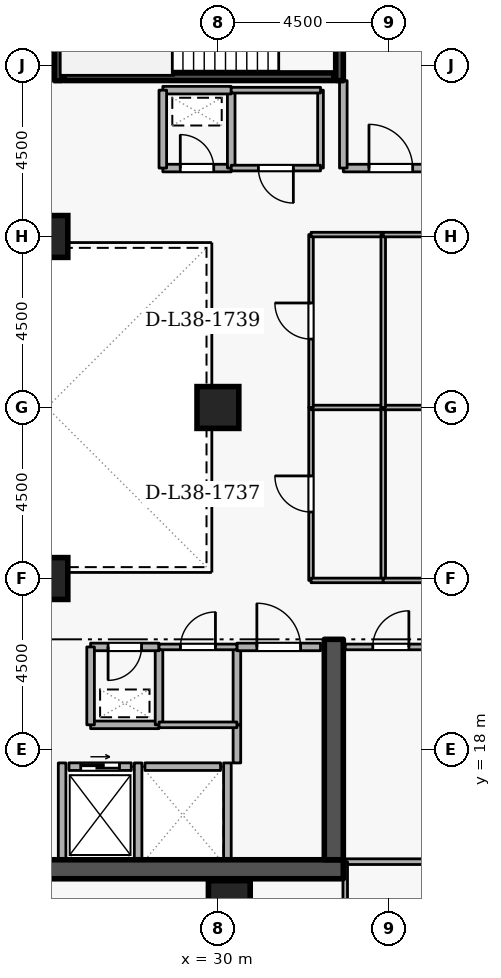
"""IFC4 building model, lengths in metres.
Left out: names, types, materials, properties, quantities, classifications, styles, units other than length and angle.
Written with IfcOpenShell. Run it as: python <this file> out.ifc"""

import sys

from ifc_helpers import new_model, si_unit, direction, frame, frame_2d, origin, origin_2d, place, context, subcontext, project, spatial, rectangle, extrude, element, fill, save


model = new_model("IFC4")
c1 = context("Model", 3, precision=1e-05, world=origin(), true_north=direction((0.0, 1.0)))
c2 = subcontext(c1, "Body", "Model", "MODEL_VIEW")
j1 = project(units=[si_unit("LENGTHUNIT", "METRE"), si_unit("PLANEANGLEUNIT", "RADIAN")], contexts=[c1])
p1 = place(None, origin())
s1 = spatial("IfcSite", under=j1, at=p1, CompositionType="ELEMENT")
p2 = place(p1, origin())
s2 = spatial("IfcBuilding", under=s1, at=p2, CompositionType="ELEMENT")
p3 = place(p2, frame((0.0, 0.0, 145.5)))
s3 = spatial("IfcBuildingStorey", under=s2, at=p3, CompositionType="ELEMENT", Elevation=145.5)
p4 = place(p3, frame((17.7, 14.85, 0.0), z_axis=(0.0, 0.0, 1.0), x_axis=(1.0, 0.0, 0.0)))
e1 = element("IfcWall", 1, at=p4, inside=s3, PredefinedType="SHEAR", context=c2, shape_type="SweptSolid", body=[
    extrude(rectangle(XDim=15.6, YDim=0.5, at=frame_2d((7.8, 0.0))), origin(), (0.0, 0.0, 1.0), 3.6),
])
p5 = place(p3, frame((33.05, 15.1, 0.0), z_axis=(0.0, 0.0, 1.0), x_axis=(0.0, 1.0, 0.0)))
e2 = element("IfcWall", 2, at=p5, inside=s3, PredefinedType="SHEAR", context=c2, shape_type="SweptSolid", body=[
    extrude(rectangle(XDim=5.8, YDim=0.5, at=frame_2d((2.9, 0.0))), origin(), (0.0, 0.0, 1.0), 3.6),
])
for number, where, z_axis, x_axis in (
    (3, (30.3, 14.0, 0.0), (0.0, 0.0, 1.0), (1.0, 0.0, 0.0)),
    (4, (25.5, 22.5, 0.0), (0.0, 0.0, 1.0), (1.0, 0.0, 0.0)),
    (5, (25.5, 31.5, 0.0), (0.0, 0.0, 1.0), (1.0, 0.0, 0.0)),
    (6, (30.0, 27.0, 0.0), (0.0, 0.0, 1.0), (1.0, 0.0, 0.0)),
):
    element("IfcColumn", number, at=place(p3, frame(where, z_axis=z_axis, x_axis=x_axis)), inside=s3, PredefinedType="COLUMN", context=c2, shape_type="SweptSolid", body=[
        extrude(rectangle(XDim=1.1, YDim=1.1, at=origin_2d()), origin(), (0.0, 0.0, 1.0), 3.6),
    ])
p6 = place(p3, frame((26.08, 17.55, 0.0), z_axis=(0.0, 0.0, 1.0), x_axis=(1.0, 0.0, 0.0)))
e7 = element("IfcWall", 7, at=p6, inside=s3, PredefinedType="STANDARD", context=c2, shape_type="SweptSolid", body=[
    extrude(rectangle(XDim=1.64, YDim=0.2, at=frame_2d((0.82, 0.0))), origin(), (0.0, 0.0, 1.0), 3.3),
])
p7 = place(p6, frame((0.31, 0.0, 0.0)))
e8 = element("IfcOpeningElement", 8, at=p7, cuts=e7, PredefinedType="OPENING", context=c2, shape_type="SweptSolid", body=[
    extrude(rectangle(XDim=1.02, YDim=2.06, at=frame_2d((0.51, 1.03))), frame((0.0, 0.11, 0.0), z_axis=(0.0, -1.0, 0.0), x_axis=(1.0, 0.0, 0.0)), (0.0, 0.0, 1.0), 0.22),
])
p8 = place(p3, frame((28.08, 17.55, 0.0), z_axis=(0.0, 0.0, 1.0), x_axis=(1.0, 0.0, 0.0)))
e9 = element("IfcWall", 9, at=p8, inside=s3, PredefinedType="STANDARD", context=c2, shape_type="SweptSolid", body=[
    extrude(rectangle(XDim=1.99, YDim=0.2, at=frame_2d((0.995, 0.0))), origin(), (0.0, 0.0, 1.0), 3.3),
])
p9 = place(p3, frame((27.9, 15.112, 0.0), z_axis=(0.0, 0.0, 1.0), x_axis=(0.0, 1.0, 0.0)))
e10 = element("IfcWall", 10, at=p9, inside=s3, PredefinedType="STANDARD", context=c2, shape_type="SweptSolid", body=[
    extrude(rectangle(XDim=2.536, YDim=0.2, at=frame_2d((1.268, 0.0))), origin(), (0.0, 0.0, 1.0), 3.3),
])
p10 = place(p3, frame((25.9, 15.112, 0.0), z_axis=(0.0, 0.0, 1.0), x_axis=(0.0, 1.0, 0.0)))
e11 = element("IfcWall", 11, at=p10, inside=s3, PredefinedType="STANDARD", context=c2, shape_type="SweptSolid", body=[
    extrude(rectangle(XDim=2.536, YDim=0.2, at=frame_2d((1.268, 0.0))), origin(), (0.0, 0.0, 1.0), 1.685),
])
p11 = place(p3, frame((30.25, 15.112, 0.0), z_axis=(0.0, 0.0, 1.0), x_axis=(0.0, 1.0, 0.0)))
e12 = element("IfcWall", 12, at=p11, inside=s3, PredefinedType="STANDARD", context=c2, shape_type="SweptSolid", body=[
    extrude(rectangle(XDim=2.536, YDim=0.2, at=frame_2d((1.268, 0.0))), origin(), (0.0, 0.0, 1.0), 3.3),
])
p12 = place(p3, frame((33.2, 38.95, 0.0), z_axis=(0.0, 0.0, 1.0), x_axis=(0.0, -1.0, 0.0)))
e13 = element("IfcWall", 13, at=p12, inside=s3, PredefinedType="SHEAR", context=c2, shape_type="SweptSolid", body=[
    extrude(rectangle(XDim=3.35, YDim=0.2, at=frame_2d((1.675, 0.0))), origin(), (0.0, 0.0, 1.0), 3.6),
])
p13 = place(p12, frame((1.125, 0.0, 0.0)))
e14 = element("IfcOpeningElement", 14, at=p13, cuts=e13, PredefinedType="OPENING", context=c2, shape_type="SweptSolid", body=[
    extrude(rectangle(XDim=1.1, YDim=2.1, at=frame_2d((0.55, 1.05))), frame((0.0, 0.11, 0.0), z_axis=(0.0, -1.0, 0.0), x_axis=(1.0, 0.0, 0.0)), (0.0, 0.0, 1.0), 0.22),
])
p14 = place(p3, frame((25.8, 35.6, 0.0), z_axis=(0.0, 0.0, 1.0), x_axis=(0.0, 1.0, 0.0)))
e15 = element("IfcWall", 15, at=p14, inside=s3, PredefinedType="SHEAR", context=c2, shape_type="SweptSolid", body=[
    extrude(rectangle(XDim=3.35, YDim=0.2, at=frame_2d((1.675, 0.0))), origin(), (0.0, 0.0, 1.0), 3.6),
])
p15 = place(p3, frame((25.95, 35.703, 0.0), z_axis=(0.0, 0.0, 1.0), x_axis=(1.0, 0.0, 0.0)))
e16 = element("IfcWall", 16, at=p15, inside=s3, PredefinedType="SHEAR", context=c2, shape_type="SweptSolid", body=[
    extrude(rectangle(XDim=7.1, YDim=0.2, at=frame_2d((3.55, 0.0))), origin(), (0.0, 0.0, 1.0), 3.6),
])
p16 = place(p3, frame((33.3, 33.3, 0.0), z_axis=(0.0, 0.0, 1.0), x_axis=(1.0, 0.0, 0.0)))
e17 = element("IfcWall", 17, at=p16, inside=s3, PredefinedType="STANDARD", context=c2, shape_type="SweptSolid", body=[
    extrude(rectangle(XDim=2.5, YDim=0.2, at=frame_2d((1.25, 0.0))), origin(), (0.0, 0.0, 1.0), 3.3),
])
p17 = place(p16, frame((0.675, 0.0, 0.0)))
e18 = element("IfcOpeningElement", 18, at=p17, cuts=e17, PredefinedType="OPENING", context=c2, shape_type="SweptSolid", body=[
    extrude(rectangle(XDim=1.15, YDim=2.1, at=frame_2d((0.575, 1.05))), frame((0.0, 0.11, 0.0), z_axis=(0.0, -1.0, 0.0), x_axis=(1.0, 0.0, 0.0)), (0.0, 0.0, 1.0), 0.22),
])
p18 = place(p3, frame((33.3, 35.6, 0.0), z_axis=(0.0, 0.0, 1.0), x_axis=(0.0, -1.0, 0.0)))
e19 = element("IfcWall", 19, at=p18, inside=s3, PredefinedType="STANDARD", context=c2, shape_type="SweptSolid", body=[
    extrude(rectangle(XDim=2.3, YDim=0.2, at=frame_2d((1.15, 0.0))), origin(), (0.0, 0.0, 1.0), 2.505),
])
p19 = place(p3, frame((26.65, 18.65, 0.0), z_axis=(0.0, 0.0, 1.0), x_axis=(1.0, 0.0, 0.0)))
e20 = element("IfcWall", 20, at=p19, inside=s3, PredefinedType="STANDARD", context=c2, shape_type="SweptSolid", body=[
    extrude(rectangle(XDim=1.8, YDim=0.2, at=frame_2d((0.9, 0.0))), origin(), (0.0, 0.0, 1.0), 3.3),
])
p20 = place(p3, frame((28.45, 18.65, 0.0), z_axis=(0.0, 0.0, 1.0), x_axis=(0.0, 1.0, 0.0)))
e21 = element("IfcWall", 21, at=p20, inside=s3, PredefinedType="STANDARD", context=c2, shape_type="SweptSolid", body=[
    extrude(rectangle(XDim=2.05, YDim=0.2, at=frame_2d((1.025, 0.0))), origin(), (0.0, 0.0, 1.0), 3.3),
])
p21 = place(p3, frame((28.45, 20.7, 0.0), z_axis=(0.0, 0.0, 1.0), x_axis=(-1.0, 0.0, 0.0)))
e22 = element("IfcWall", 22, at=p21, inside=s3, PredefinedType="STANDARD", context=c2, shape_type="SweptSolid", body=[
    extrude(rectangle(XDim=1.8, YDim=0.2, at=frame_2d((0.9, 0.0))), origin(), (0.0, 0.0, 1.0), 3.3),
])
p22 = place(p21, frame((0.46, 0.0, 0.0)))
e23 = element("IfcOpeningElement", 23, at=p22, cuts=e22, PredefinedType="OPENING", context=c2, shape_type="SweptSolid", body=[
    extrude(rectangle(XDim=0.88, YDim=2.04, at=frame_2d((0.44, 1.02))), frame((0.0, 0.11, 0.0), z_axis=(0.0, -1.0, 0.0), x_axis=(1.0, 0.0, 0.0)), (0.0, 0.0, 1.0), 0.22),
])
p23 = place(p3, frame((26.65, 20.7, 0.0), z_axis=(0.0, 0.0, 1.0), x_axis=(0.0, -1.0, 0.0)))
e24 = element("IfcWall", 24, at=p23, inside=s3, PredefinedType="STANDARD", context=c2, shape_type="SweptSolid", body=[
    extrude(rectangle(XDim=2.05, YDim=0.2, at=frame_2d((1.025, 0.0))), origin(), (0.0, 0.0, 1.0), 3.3),
])
p24 = place(p3, frame((28.55, 33.3, 0.0), z_axis=(0.0, 0.0, 1.0), x_axis=(1.0, 0.0, 0.0)))
e25 = element("IfcWall", 25, at=p24, inside=s3, PredefinedType="STANDARD", context=c2, shape_type="SweptSolid", body=[
    extrude(rectangle(XDim=1.8, YDim=0.2, at=frame_2d((0.9, 0.0))), origin(), (0.0, 0.0, 1.0), 3.3),
])
p25 = place(p24, frame((0.46, 0.0, 0.0)))
e26 = element("IfcOpeningElement", 26, at=p25, cuts=e25, PredefinedType="OPENING", context=c2, shape_type="SweptSolid", body=[
    extrude(rectangle(XDim=0.88, YDim=2.04, at=frame_2d((0.44, 1.02))), frame((0.0, 0.11, 0.0), z_axis=(0.0, -1.0, 0.0), x_axis=(1.0, 0.0, 0.0)), (0.0, 0.0, 1.0), 0.22),
])
p26 = place(p3, frame((30.35, 33.3, 0.0), z_axis=(0.0, 0.0, 1.0), x_axis=(0.0, 1.0, 0.0)))
e27 = element("IfcWall", 27, at=p26, inside=s3, PredefinedType="STANDARD", context=c2, shape_type="SweptSolid", body=[
    extrude(rectangle(XDim=2.05, YDim=0.2, at=frame_2d((1.025, 0.0))), origin(), (0.0, 0.0, 1.0), 3.3),
])
p27 = place(p3, frame((30.35, 35.35, 0.0), z_axis=(0.0, 0.0, 1.0), x_axis=(-1.0, 0.0, 0.0)))
e28 = element("IfcWall", 28, at=p27, inside=s3, PredefinedType="STANDARD", context=c2, shape_type="SweptSolid", body=[
    extrude(rectangle(XDim=1.8, YDim=0.2, at=frame_2d((0.9, 0.0))), origin(), (0.0, 0.0, 1.0), 3.3),
])
p28 = place(p3, frame((28.55, 35.35, 0.0), z_axis=(0.0, 0.0, 1.0), x_axis=(0.0, -1.0, 0.0)))
e29 = element("IfcWall", 29, at=p28, inside=s3, PredefinedType="STANDARD", context=c2, shape_type="SweptSolid", body=[
    extrude(rectangle(XDim=2.05, YDim=0.2, at=frame_2d((1.025, 0.0))), origin(), (0.0, 0.0, 1.0), 3.3),
])
p29 = place(p3, frame((30.5, 17.648, 0.0), z_axis=(0.0, 0.0, 1.0), x_axis=(0.0, 1.0, 0.0)))
e30 = element("IfcWall", 30, at=p29, inside=s3, PredefinedType="STANDARD", context=c2, shape_type="SweptSolid", body=[
    extrude(rectangle(XDim=1.002, YDim=0.2, at=frame_2d((0.501, 0.0))), origin(), (0.0, 0.0, 1.0), 3.3),
])
p30 = place(p3, frame((30.5, 18.65, 0.0), z_axis=(0.0, 0.0, 1.0), x_axis=(0.0, 1.0, 0.0)))
e31 = element("IfcWall", 31, at=p30, inside=s3, PredefinedType="STANDARD", context=c2, shape_type="SweptSolid", body=[
    extrude(rectangle(XDim=2.05, YDim=0.2, at=frame_2d((1.025, 0.0))), origin(), (0.0, 0.0, 1.0), 3.3),
])
p31 = place(p3, frame((30.5, 20.7, 0.0), z_axis=(0.0, 0.0, 1.0), x_axis=(1.0, 0.0, 0.0)))
e32 = element("IfcWall", 32, at=p31, inside=s3, PredefinedType="STANDARD", context=c2, shape_type="SweptSolid", body=[
    extrude(rectangle(XDim=2.2, YDim=0.2, at=frame_2d((1.1, 0.0))), origin(), (0.0, 0.0, 1.0), 3.3),
])
p32 = place(p31, frame((0.525, 0.0, 0.0)))
e33 = element("IfcOpeningElement", 33, at=p32, cuts=e32, PredefinedType="OPENING", context=c2, shape_type="SweptSolid", body=[
    extrude(rectangle(XDim=1.15, YDim=2.1, at=frame_2d((0.575, 1.05))), frame((0.0, 0.11, 0.0), z_axis=(0.0, -1.0, 0.0), x_axis=(1.0, 0.0, 0.0)), (0.0, 0.0, 1.0), 0.22),
])
p33 = place(p3, frame((30.5, 18.65, 0.0), z_axis=(0.0, 0.0, 1.0), x_axis=(-1.0, 0.0, 0.0)))
e34 = element("IfcWall", 34, at=p33, inside=s3, PredefinedType="PARTITIONING", context=c2, shape_type="SweptSolid", body=[
    extrude(rectangle(XDim=2.05, YDim=0.15, at=frame_2d((1.025, 0.0))), origin(), (0.0, 0.0, 1.0), 3.3),
])
p34 = place(p3, frame((28.45, 20.7, 0.0), z_axis=(0.0, 0.0, 1.0), x_axis=(1.0, 0.0, 0.0)))
e35 = element("IfcWall", 35, at=p34, inside=s3, PredefinedType="PARTITIONING", context=c2, shape_type="SweptSolid", body=[
    extrude(rectangle(XDim=2.05, YDim=0.15, at=frame_2d((1.025, 0.0))), origin(), (0.0, 0.0, 1.0), 3.3),
])
p35 = place(p34, frame((0.565, 0.0, 0.0)))
e36 = element("IfcOpeningElement", 36, at=p35, cuts=e35, PredefinedType="OPENING", context=c2, shape_type="SweptSolid", body=[
    extrude(rectangle(XDim=0.92, YDim=2.08, at=frame_2d((0.46, 1.04))), frame((0.0, 0.085, 0.0), z_axis=(0.0, -1.0, 0.0), x_axis=(1.0, 0.0, 0.0)), (0.0, 0.0, 1.0), 0.17),
])
p36 = place(p3, frame((32.7, 35.35, 0.0), z_axis=(0.0, 0.0, 1.0), x_axis=(0.0, -1.0, 0.0)))
e37 = element("IfcWall", 37, at=p36, inside=s3, PredefinedType="PARTITIONING", context=c2, shape_type="SweptSolid", body=[
    extrude(rectangle(XDim=2.05, YDim=0.15, at=frame_2d((1.025, 0.0))), origin(), (0.0, 0.0, 1.0), 2.505),
])
p37 = place(p3, frame((32.7, 33.3, 0.0), z_axis=(0.0, 0.0, 1.0), x_axis=(-1.0, 0.0, 0.0)))
e38 = element("IfcWall", 38, at=p37, inside=s3, PredefinedType="PARTITIONING", context=c2, shape_type="SweptSolid", body=[
    extrude(rectangle(XDim=2.35, YDim=0.15, at=frame_2d((1.175, 0.0))), origin(), (0.0, 0.0, 1.0), 3.3),
])
p38 = place(p37, frame((0.715, 0.0, 0.0)))
e39 = element("IfcOpeningElement", 39, at=p38, cuts=e38, PredefinedType="OPENING", context=c2, shape_type="SweptSolid", body=[
    extrude(rectangle(XDim=0.92, YDim=2.08, at=frame_2d((0.46, 1.04))), frame((0.0, 0.085, 0.0), z_axis=(0.0, -1.0, 0.0), x_axis=(1.0, 0.0, 0.0)), (0.0, 0.0, 1.0), 0.17),
])
p39 = place(p3, frame((30.35, 35.35, 0.0), z_axis=(0.0, 0.0, 1.0), x_axis=(1.0, 0.0, 0.0)))
e40 = element("IfcWall", 40, at=p39, inside=s3, PredefinedType="PARTITIONING", context=c2, shape_type="SweptSolid", body=[
    extrude(rectangle(XDim=2.35, YDim=0.15, at=frame_2d((1.175, 0.0))), origin(), (0.0, 0.0, 1.0), 3.3),
])
p40 = place(p3, frame((35.75, 15.05, 0.0), z_axis=(0.0, 0.0, 1.0), x_axis=(-1.0, 0.0, 0.0)))
e41 = element("IfcWall", 41, at=p40, inside=s3, PredefinedType="PARTITIONING", context=c2, shape_type="SweptSolid", body=[
    extrude(rectangle(XDim=2.4, YDim=0.15, at=frame_2d((1.2, 0.0))), origin(), (0.0, 0.0, 1.0), 3.3),
])
p41 = place(p3, frame((33.35, 20.7, 0.0), z_axis=(0.0, 0.0, 1.0), x_axis=(1.0, 0.0, 0.0)))
e42 = element("IfcWall", 42, at=p41, inside=s3, PredefinedType="PARTITIONING", context=c2, shape_type="SweptSolid", body=[
    extrude(rectangle(XDim=2.4, YDim=0.15, at=frame_2d((1.2, 0.0))), origin(), (0.0, 0.0, 1.0), 3.3),
])
p42 = place(p41, frame((0.725, 0.0, 0.0)))
e43 = element("IfcOpeningElement", 43, at=p42, cuts=e42, PredefinedType="OPENING", context=c2, shape_type="SweptSolid", body=[
    extrude(rectangle(XDim=0.95, YDim=2.1, at=frame_2d((0.475, 1.05))), frame((0.0, 0.085, 0.0), z_axis=(0.0, -1.0, 0.0), x_axis=(1.0, 0.0, 0.0)), (0.0, 0.0, 1.0), 0.17),
])
p43 = place(p3, frame((32.45, 22.45, 0.0), z_axis=(0.0, 0.0, 1.0), x_axis=(0.0, 1.0, 0.0)))
e44 = element("IfcWall", 44, at=p43, inside=s3, PredefinedType="PARTITIONING", context=c2, shape_type="SweptSolid", body=[
    extrude(rectangle(XDim=4.55, YDim=0.12, at=frame_2d((2.275, 0.0))), origin(), (0.0, 0.0, 1.0), 3.3),
])
p44 = place(p43, frame((1.8, 0.0, 0.0)))
e45 = element("IfcOpeningElement", 45, at=p44, cuts=e44, PredefinedType="OPENING", context=c2, shape_type="SweptSolid", body=[
    extrude(rectangle(XDim=0.95, YDim=2.1, at=frame_2d((0.475, 1.05))), frame((0.0, 0.07, 0.0), z_axis=(0.0, -1.0, 0.0), x_axis=(1.0, 0.0, 0.0)), (0.0, 0.0, 1.0), 0.14),
])
p45 = place(p3, frame((32.45, 27.0, 0.0), z_axis=(0.0, 0.0, 1.0), x_axis=(1.0, 0.0, 0.0)))
e46 = element("IfcWall", 46, at=p45, inside=s3, PredefinedType="PARTITIONING", context=c2, shape_type="SweptSolid", body=[
    extrude(rectangle(XDim=1.9, YDim=0.12, at=frame_2d((0.95, 0.0))), origin(), (0.0, 0.0, 1.0), 1.685),
])
p46 = place(p3, frame((34.35, 27.0, 0.0), z_axis=(0.0, 0.0, 1.0), x_axis=(0.0, -1.0, 0.0)))
e47 = element("IfcWall", 47, at=p46, inside=s3, PredefinedType="PARTITIONING", context=c2, shape_type="SweptSolid", body=[
    extrude(rectangle(XDim=4.55, YDim=0.12, at=frame_2d((2.275, 0.0))), origin(), (0.0, 0.0, 1.0), 3.3),
])
p47 = place(p3, frame((34.35, 22.45, 0.0), z_axis=(0.0, 0.0, 1.0), x_axis=(-1.0, 0.0, 0.0)))
e48 = element("IfcWall", 48, at=p47, inside=s3, PredefinedType="PARTITIONING", context=c2, shape_type="SweptSolid", body=[
    extrude(rectangle(XDim=1.9, YDim=0.12, at=frame_2d((0.95, 0.0))), origin(), (0.0, 0.0, 1.0), 3.3),
])
p48 = place(p3, frame((33.35, 3.28, 0.0), z_axis=(0.0, 0.0, 1.0), x_axis=(0.0, 1.0, 0.0)))
e49 = element("IfcWall", 49, at=p48, inside=s3, PredefinedType="PARTITIONING", context=c2, shape_type="SweptSolid", body=[
    extrude(rectangle(XDim=11.77, YDim=0.12, at=frame_2d((5.885, 0.0))), origin(), (0.0, 0.0, 1.0), 2.505),
])
p49 = place(p3, frame((37.75, 22.45, 0.0), z_axis=(0.0, 0.0, 1.0), x_axis=(-1.0, 0.0, 0.0)))
e50 = element("IfcWall", 50, at=p49, inside=s3, PredefinedType="PARTITIONING", context=c2, shape_type="SweptSolid", body=[
    extrude(rectangle(XDim=3.4, YDim=0.12, at=frame_2d((1.7, 0.0))), origin(), (0.0, 0.0, 1.0), 3.3),
])
p50 = place(p49, frame((1.175, 0.0, 0.0)))
e51 = element("IfcOpeningElement", 51, at=p50, cuts=e50, PredefinedType="OPENING", context=c2, shape_type="SweptSolid", body=[
    extrude(rectangle(XDim=1.05, YDim=2.1, at=frame_2d((0.525, 1.05))), frame((0.0, 0.07, 0.0), z_axis=(0.0, -1.0, 0.0), x_axis=(1.0, 0.0, 0.0)), (0.0, 0.0, 1.0), 0.14),
])
p51 = place(p3, frame((34.35, 27.0, 0.0), z_axis=(0.0, 0.0, 1.0), x_axis=(1.0, 0.0, 0.0)))
e52 = element("IfcWall", 52, at=p51, inside=s3, PredefinedType="PARTITIONING", context=c2, shape_type="SweptSolid", body=[
    extrude(rectangle(XDim=8.87, YDim=0.12, at=frame_2d((4.435, 0.0))), origin(), (0.0, 0.0, 1.0), 1.685),
])
p52 = place(p3, frame((32.45, 27.0, 0.0), z_axis=(0.0, 0.0, 1.0), x_axis=(0.0, 1.0, 0.0)))
e53 = element("IfcWall", 53, at=p52, inside=s3, PredefinedType="PARTITIONING", context=c2, shape_type="SweptSolid", body=[
    extrude(rectangle(XDim=4.55, YDim=0.12, at=frame_2d((2.275, 0.0))), origin(), (0.0, 0.0, 1.0), 3.3),
])
p53 = place(p52, frame((1.8, 0.0, 0.0)))
e54 = element("IfcOpeningElement", 54, at=p53, cuts=e53, PredefinedType="OPENING", context=c2, shape_type="SweptSolid", body=[
    extrude(rectangle(XDim=0.95, YDim=2.1, at=frame_2d((0.475, 1.05))), frame((0.0, 0.07, 0.0), z_axis=(0.0, -1.0, 0.0), x_axis=(1.0, 0.0, 0.0)), (0.0, 0.0, 1.0), 0.14),
])
p54 = place(p3, frame((32.45, 31.55, 0.0), z_axis=(0.0, 0.0, 1.0), x_axis=(1.0, 0.0, 0.0)))
e55 = element("IfcWall", 55, at=p54, inside=s3, PredefinedType="PARTITIONING", context=c2, shape_type="SweptSolid", body=[
    extrude(rectangle(XDim=1.9, YDim=0.12, at=frame_2d((0.95, 0.0))), origin(), (0.0, 0.0, 1.0), 3.3),
])
p55 = place(p3, frame((34.35, 31.55, 0.0), z_axis=(0.0, 0.0, 1.0), x_axis=(0.0, -1.0, 0.0)))
e56 = element("IfcWall", 56, at=p55, inside=s3, PredefinedType="PARTITIONING", context=c2, shape_type="SweptSolid", body=[
    extrude(rectangle(XDim=4.55, YDim=0.12, at=frame_2d((2.275, 0.0))), origin(), (0.0, 0.0, 1.0), 3.3),
])
p56 = place(p3, frame((34.35, 31.55, 0.0), z_axis=(0.0, 0.0, 1.0), x_axis=(1.0, 0.0, 0.0)))
e57 = element("IfcWall", 57, at=p56, inside=s3, PredefinedType="PARTITIONING", context=c2, shape_type="SweptSolid", body=[
    extrude(rectangle(XDim=1.45, YDim=0.12, at=frame_2d((0.725, 0.0))), origin(), (0.0, 0.0, 1.0), 3.3),
])
p57 = place(p7, origin())
e58 = element("IfcDoor", 58, at=p57, inside=s3, OperationType="SLIDING_TO_LEFT", PredefinedType="DOOR", context=c2, shape_type="SweptSolid", body=[
    extrude(rectangle(XDim=1.02, YDim=2.06, at=frame_2d((0.51, 1.03))), frame((0.0, 0.025, 0.0), z_axis=(0.0, -1.0, 0.0), x_axis=(1.0, 0.0, 0.0)), (0.0, 0.0, 1.0), 0.05),
])
fill(e8, e58)
p58 = place(p17, origin())
e59 = element("IfcDoor", 59, at=p58, inside=s3, OperationType="SINGLE_SWING_LEFT", PredefinedType="DOOR", context=c2, shape_type="SweptSolid", body=[
    extrude(rectangle(XDim=1.15, YDim=2.1, at=frame_2d((0.575, 1.05))), frame((0.0, 0.025, 0.0), z_axis=(0.0, -1.0, 0.0), x_axis=(1.0, 0.0, 0.0)), (0.0, 0.0, 1.0), 0.05),
])
fill(e18, e59)
p59 = place(p22, origin())
e60 = element("IfcDoor", 60, at=p59, inside=s3, OperationType="SINGLE_SWING_RIGHT", PredefinedType="DOOR", context=c2, shape_type="SweptSolid", body=[
    extrude(rectangle(XDim=0.88, YDim=2.04, at=frame_2d((0.44, 1.02))), frame((0.0, 0.025, 0.0), z_axis=(0.0, -1.0, 0.0), x_axis=(1.0, 0.0, 0.0)), (0.0, 0.0, 1.0), 0.05),
])
fill(e23, e60)
p60 = place(p25, origin())
e61 = element("IfcDoor", 61, at=p60, inside=s3, OperationType="SINGLE_SWING_LEFT", PredefinedType="DOOR", context=c2, shape_type="SweptSolid", body=[
    extrude(rectangle(XDim=0.88, YDim=2.04, at=frame_2d((0.44, 1.02))), frame((0.0, 0.025, 0.0), z_axis=(0.0, -1.0, 0.0), x_axis=(1.0, 0.0, 0.0)), (0.0, 0.0, 1.0), 0.05),
])
fill(e26, e61)
p61 = place(p35, origin())
e62 = element("IfcDoor", 62, at=p61, inside=s3, OperationType="SINGLE_SWING_RIGHT", PredefinedType="DOOR", context=c2, shape_type="SweptSolid", body=[
    extrude(rectangle(XDim=0.92, YDim=2.08, at=frame_2d((0.46, 1.04))), frame((0.0, 0.025, 0.0), z_axis=(0.0, -1.0, 0.0), x_axis=(1.0, 0.0, 0.0)), (0.0, 0.0, 1.0), 0.05),
])
fill(e36, e62)
p62 = place(p32, origin())
e63 = element("IfcDoor", 63, at=p62, inside=s3, OperationType="SINGLE_SWING_LEFT", PredefinedType="DOOR", context=c2, shape_type="SweptSolid", body=[
    extrude(rectangle(XDim=1.15, YDim=2.1, at=frame_2d((0.575, 1.05))), frame((0.0, 0.025, 0.0), z_axis=(0.0, -1.0, 0.0), x_axis=(1.0, 0.0, 0.0)), (0.0, 0.0, 1.0), 0.05),
])
fill(e33, e63)
p63 = place(p38, origin())
e64 = element("IfcDoor", 64, at=p63, inside=s3, OperationType="SINGLE_SWING_LEFT", PredefinedType="DOOR", context=c2, shape_type="SweptSolid", body=[
    extrude(rectangle(XDim=0.92, YDim=2.08, at=frame_2d((0.46, 1.04))), frame((0.0, 0.025, 0.0), z_axis=(0.0, -1.0, 0.0), x_axis=(1.0, 0.0, 0.0)), (0.0, 0.0, 1.0), 0.05),
])
fill(e39, e64)
p64 = place(p42, origin())
e65 = element("IfcDoor", 65, at=p64, inside=s3, OperationType="SINGLE_SWING_RIGHT", PredefinedType="DOOR", context=c2, shape_type="SweptSolid", body=[
    extrude(rectangle(XDim=0.95, YDim=2.1, at=frame_2d((0.475, 1.05))), frame((0.0, 0.025, 0.0), z_axis=(0.0, -1.0, 0.0), x_axis=(1.0, 0.0, 0.0)), (0.0, 0.0, 1.0), 0.05),
])
fill(e43, e65)
p65 = place(p44, origin())
e66 = element("IfcDoor", 66, at=p65, inside=s3, OperationType="SINGLE_SWING_RIGHT", PredefinedType="DOOR", context=c2, shape_type="SweptSolid", body=[
    extrude(rectangle(XDim=0.95, YDim=2.1, at=frame_2d((0.475, 1.05))), frame((0.0, 0.025, 0.0), z_axis=(0.0, -1.0, 0.0), x_axis=(1.0, 0.0, 0.0)), (0.0, 0.0, 1.0), 0.05),
])
fill(e45, e66)
p66 = place(p53, origin())
e67 = element("IfcDoor", 67, at=p66, inside=s3, OperationType="SINGLE_SWING_RIGHT", PredefinedType="DOOR", context=c2, shape_type="SweptSolid", body=[
    extrude(rectangle(XDim=0.95, YDim=2.1, at=frame_2d((0.475, 1.05))), frame((0.0, 0.025, 0.0), z_axis=(0.0, -1.0, 0.0), x_axis=(1.0, 0.0, 0.0)), (0.0, 0.0, 1.0), 0.05),
])
fill(e54, e67)
save(model, sys.argv[1])
